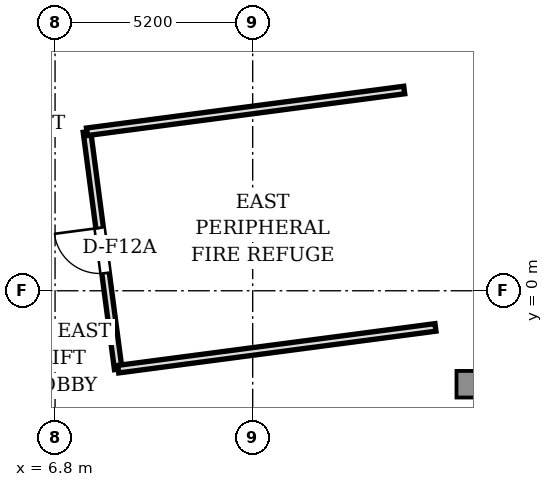
"""IFC4 building model, lengths in metres.
Left out: names, types, materials, properties, quantities, classifications, styles, units other than length and angle.
Written with IfcOpenShell. Run it as: python <this file> out.ifc"""

import sys

from ifc_helpers import new_model, si_unit, direction, frame, frame_2d, origin, origin_2d, place, context, subcontext, project, spatial, rectangle, extrude, source, transform, mapped, element, fill, save


model = new_model("IFC4")
c1 = context("Model", 3, precision=1e-05, world=origin(), true_north=direction((0.0, 1.0)))
c2 = subcontext(c1, "Body", "Model", "MODEL_VIEW")
j1 = project(units=[si_unit("LENGTHUNIT", "METRE"), si_unit("PLANEANGLEUNIT", "RADIAN")], contexts=[c1])
p1 = place(None, origin())
s1 = spatial("IfcSite", under=j1, at=p1, CompositionType="ELEMENT")
p2 = place(p1, origin())
s2 = spatial("IfcBuilding", under=s1, at=p2, CompositionType="ELEMENT")
p3 = place(p2, frame((0.0, 0.0, 264.6)))
s3 = spatial("IfcBuildingStorey", under=s2, at=p3, CompositionType="ELEMENT", Elevation=264.6)
m1 = source(origin(), c2, "Body", "SweptSolid", [
    extrude(rectangle(XDim=0.7, YDim=0.7, at=origin_2d()), origin(), (0.0, 0.0, 1.0), 4.26),
])
p4 = place(p3, frame((17.712, -2.459, 0.0), z_axis=(0.0, 0.0, 1.0), x_axis=(1.0, 0.0, 0.0)))
e1 = element("IfcColumn", 1, at=p4, inside=s3, PredefinedType="COLUMN", context=c2, shape_type="MappedRepresentation", body=[
    mapped(m1, transform((0.0, 0.0, 0.0), scale=1.0)),
])
p5 = place(p3, frame((8.462, -2.063, 0.0), z_axis=(0.0, 0.0, 1.0), x_axis=(-0.130518669044, 0.99144585179, 0.0)))
e2 = element("IfcWall", 2, at=p5, inside=s3, PredefinedType="SOLIDWALL", context=c2, shape_type="SweptSolid", body=[
    extrude(rectangle(XDim=6.3, YDim=0.2, at=frame_2d((3.15, 0.0))), origin(), (0.0, 0.0, 1.0), 3.81),
])
p6 = place(p5, frame((2.55, 0.0, 0.0)))
e3 = element("IfcOpeningElement", 3, at=p6, cuts=e2, PredefinedType="OPENING", context=c2, shape_type="SweptSolid", body=[
    extrude(rectangle(XDim=1.2, YDim=2.2, at=frame_2d((0.6, 1.1))), frame((0.0, 0.11, 0.0), z_axis=(0.0, -1.0, 0.0), x_axis=(1.0, 0.0, 0.0)), (0.0, 0.0, 1.0), 0.22),
])
p7 = place(p3, frame((7.639, 4.183, 0.0), z_axis=(0.0, 0.0, 1.0), x_axis=(0.991443337312, 0.130537768098, 0.0)))
e4 = element("IfcWall", 4, at=p7, inside=s3, PredefinedType="SOLIDWALL", context=c2, shape_type="SweptSolid", body=[
    extrude(rectangle(XDim=8.42, YDim=0.2, at=frame_2d((4.21, 0.0))), origin(), (0.0, 0.0, 1.0), 3.81),
])
p8 = place(p3, frame((8.462, -2.063, 0.0), z_axis=(0.0, 0.0, 1.0), x_axis=(0.991443831377, 0.130534015583, 0.0)))
e5 = element("IfcWall", 5, at=p8, inside=s3, PredefinedType="SOLIDWALL", context=c2, shape_type="SweptSolid", body=[
    extrude(rectangle(XDim=8.42, YDim=0.2, at=frame_2d((4.21, 0.0))), origin(), (0.0, 0.0, 1.0), 3.81),
])
m2 = source(origin(), c2, "Body", "SweptSolid", [
    extrude(rectangle(XDim=1.2, YDim=0.05, at=origin_2d()), origin(), (0.0, 0.0, 1.0), 2.2),
])
p9 = place(p6, frame((0.6, 0.0, 0.0)))
e6 = element("IfcDoor", 6, at=p9, inside=s3, OperationType="SINGLE_SWING_RIGHT", PredefinedType="DOOR", context=c2, shape_type="MappedRepresentation", body=[
    mapped(m2, transform((0.0, 0.0, 0.0), scale=1.0)),
])
fill(e3, e6)
save(model, sys.argv[1])
